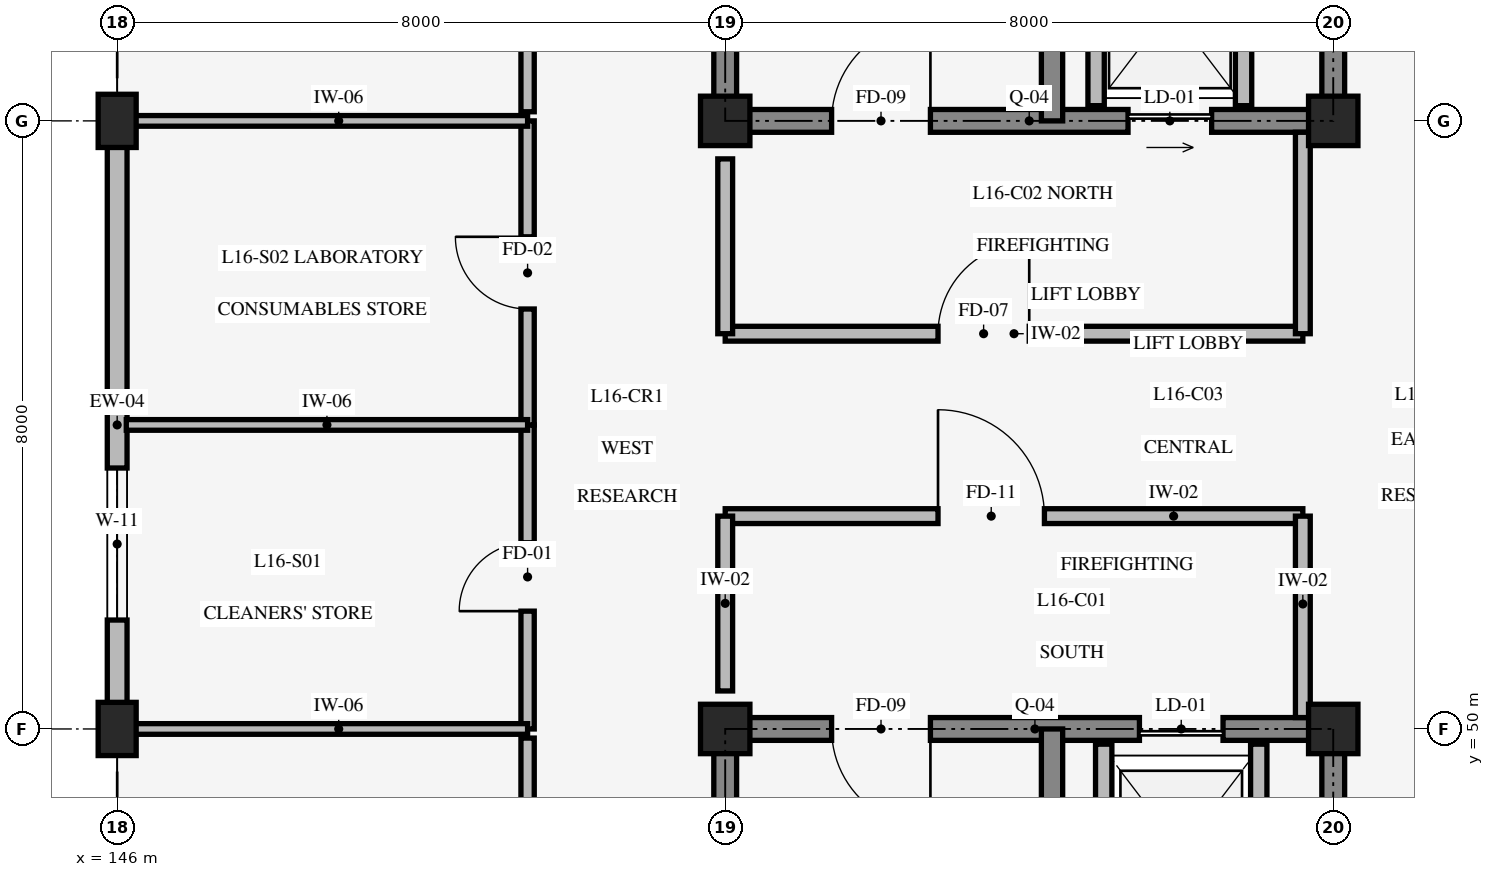
"""IFC4 building model, lengths in metres.
Left out: names, types, materials, properties, quantities, classifications, styles, units other than length and angle.
Written with IfcOpenShell. Run it as: python <this file> out.ifc"""

import sys

from ifc_helpers import new_model, si_unit, direction, frame, frame_2d, origin, origin_2d, place, context, subcontext, project, spatial, rectangle, extrude, element, fill, save


model = new_model("IFC4")
c1 = context("Model", 3, precision=1e-05, world=origin(), true_north=direction((0.0, 1.0)))
c2 = subcontext(c1, "Body", "Model", "MODEL_VIEW")
j1 = project(units=[si_unit("LENGTHUNIT", "METRE"), si_unit("PLANEANGLEUNIT", "RADIAN")], contexts=[c1])
p1 = place(None, origin())
s1 = spatial("IfcSite", under=j1, at=p1, CompositionType="ELEMENT")
p2 = place(p1, origin())
s2 = spatial("IfcBuilding", under=s1, at=p2, CompositionType="ELEMENT")
p3 = place(p2, frame((0.0, 0.0, 65.4)))
s3 = spatial("IfcBuildingStorey", under=s2, at=p3, CompositionType="ELEMENT", Elevation=65.4)
p4 = place(p3, frame((162.0, 42.0, 0.0), z_axis=(0.0, 0.0, 1.0), x_axis=(0.0, 1.0, 0.0)))
e1 = element("IfcWall", 1, at=p4, inside=s3, PredefinedType="SHEAR", context=c2, shape_type="SweptSolid", body=[
    extrude(rectangle(XDim=8.0, YDim=0.3, at=frame_2d((4.0, 0.0))), origin(), (0.0, 0.0, 1.0), 3.95),
])
p5 = place(p4, frame((3.175, 0.0, 0.0)))
e2 = element("IfcOpeningElement", 2, at=p5, cuts=e1, PredefinedType="OPENING", context=c2, shape_type="SweptSolid", body=[
    extrude(rectangle(XDim=1.05, YDim=2.2, at=frame_2d((0.525, 1.1))), frame((0.0, 0.16, 0.0), z_axis=(0.0, -1.0, 0.0), x_axis=(1.0, 0.0, 0.0)), (0.0, 0.0, 1.0), 0.32),
])
p6 = place(p3, frame((162.0, 50.0, 0.0), z_axis=(0.0, 0.0, 1.0), x_axis=(-1.0, 0.0, 0.0)))
e3 = element("IfcWall", 3, at=p6, inside=s3, PredefinedType="SHEAR", context=c2, shape_type="SweptSolid", body=[
    extrude(rectangle(XDim=8.0, YDim=0.3, at=frame_2d((4.0, 0.0))), origin(), (0.0, 0.0, 1.0), 3.95),
])
p7 = place(p6, frame((5.3, 0.0, 0.0)))
e4 = element("IfcOpeningElement", 4, at=p7, cuts=e3, PredefinedType="OPENING", context=c2, shape_type="SweptSolid", body=[
    extrude(rectangle(XDim=1.3, YDim=2.15, at=frame_2d((0.65, 1.075))), frame((0.0, 0.16, 0.0), z_axis=(0.0, -1.0, 0.0), x_axis=(1.0, 0.0, 0.0)), (0.0, 0.0, 1.0), 0.32),
])
p8 = place(p6, frame((1.45, 0.0, 0.0)))
e5 = element("IfcOpeningElement", 5, at=p8, cuts=e3, PredefinedType="OPENING", context=c2, shape_type="SweptSolid", body=[
    extrude(rectangle(XDim=1.1, YDim=2.2, at=frame_2d((0.55, 1.1))), frame((0.0, 0.16, 0.0), z_axis=(0.0, -1.0, 0.0), x_axis=(1.0, 0.0, 0.0)), (0.0, 0.0, 1.0), 0.32),
])
p9 = place(p3, frame((154.0, 50.0, 0.0), z_axis=(0.0, 0.0, 1.0), x_axis=(0.0, -1.0, 0.0)))
e6 = element("IfcWall", 6, at=p9, inside=s3, PredefinedType="SHEAR", context=c2, shape_type="SweptSolid", body=[
    extrude(rectangle(XDim=8.0, YDim=0.3, at=frame_2d((4.0, 0.0))), origin(), (0.0, 0.0, 1.0), 3.95),
])
p10 = place(p3, frame((158.3, 42.0, 0.0), z_axis=(0.0, 0.0, 1.0), x_axis=(0.0, 1.0, 0.0)))
e7 = element("IfcWall", 7, at=p10, inside=s3, PredefinedType="SHEAR", context=c2, shape_type="SweptSolid", body=[
    extrude(rectangle(XDim=8.0, YDim=0.28, at=frame_2d((4.0, 0.0))), origin(), (0.0, 0.0, 1.0), 3.95),
])
p11 = place(p3, frame((154.0, 58.0, 0.0), z_axis=(0.0, 0.0, 1.0), x_axis=(1.0, 0.0, 0.0)))
e8 = element("IfcWall", 8, at=p11, inside=s3, PredefinedType="SHEAR", context=c2, shape_type="SweptSolid", body=[
    extrude(rectangle(XDim=8.0, YDim=0.3, at=frame_2d((4.0, 0.0))), origin(), (0.0, 0.0, 1.0), 3.95),
])
p12 = place(p11, frame((1.4, 0.0, 0.0)))
e9 = element("IfcOpeningElement", 9, at=p12, cuts=e8, PredefinedType="OPENING", context=c2, shape_type="SweptSolid", body=[
    extrude(rectangle(XDim=1.3, YDim=2.15, at=frame_2d((0.65, 1.075))), frame((0.0, 0.16, 0.0), z_axis=(0.0, -1.0, 0.0), x_axis=(1.0, 0.0, 0.0)), (0.0, 0.0, 1.0), 0.32),
])
p13 = place(p11, frame((5.3, 0.0, 0.0)))
e10 = element("IfcOpeningElement", 10, at=p13, cuts=e8, PredefinedType="OPENING", context=c2, shape_type="SweptSolid", body=[
    extrude(rectangle(XDim=1.1, YDim=2.2, at=frame_2d((0.55, 1.1))), frame((0.0, 0.16, 0.0), z_axis=(0.0, -1.0, 0.0), x_axis=(1.0, 0.0, 0.0)), (0.0, 0.0, 1.0), 0.32),
])
p14 = place(p3, frame((162.0, 58.0, 0.0), z_axis=(0.0, 0.0, 1.0), x_axis=(0.0, 1.0, 0.0)))
e11 = element("IfcWall", 11, at=p14, inside=s3, PredefinedType="SHEAR", context=c2, shape_type="SweptSolid", body=[
    extrude(rectangle(XDim=8.0, YDim=0.3, at=frame_2d((4.0, 0.0))), origin(), (0.0, 0.0, 1.0), 3.95),
])
p15 = place(p14, frame((3.275, 0.0, 0.0)))
e12 = element("IfcOpeningElement", 12, at=p15, cuts=e11, PredefinedType="OPENING", context=c2, shape_type="SweptSolid", body=[
    extrude(rectangle(XDim=1.05, YDim=2.2, at=frame_2d((0.525, 1.1))), frame((0.0, 0.16, 0.0), z_axis=(0.0, -1.0, 0.0), x_axis=(1.0, 0.0, 0.0)), (0.0, 0.0, 1.0), 0.32),
])
p16 = place(p14, frame((5.45, 0.0, 0.0)))
e13 = element("IfcOpeningElement", 13, at=p16, cuts=e11, PredefinedType="OPENING", context=c2, shape_type="SweptSolid", body=[
    extrude(rectangle(XDim=1.4, YDim=2.3, at=frame_2d((0.7, 1.15))), frame((0.0, 0.16, 0.0), z_axis=(0.0, -1.0, 0.0), x_axis=(1.0, 0.0, 0.0)), (0.0, 0.0, 1.0), 0.32),
])
p17 = place(p3, frame((154.0, 66.0, 0.0), z_axis=(0.0, 0.0, 1.0), x_axis=(0.0, -1.0, 0.0)))
e14 = element("IfcWall", 14, at=p17, inside=s3, PredefinedType="SHEAR", context=c2, shape_type="SweptSolid", body=[
    extrude(rectangle(XDim=8.0, YDim=0.3, at=frame_2d((4.0, 0.0))), origin(), (0.0, 0.0, 1.0), 3.95),
])
p18 = place(p3, frame((158.3, 58.0, 0.0), z_axis=(0.0, 0.0, 1.0), x_axis=(0.0, 1.0, 0.0)))
e15 = element("IfcWall", 15, at=p18, inside=s3, PredefinedType="SHEAR", context=c2, shape_type="SweptSolid", body=[
    extrude(rectangle(XDim=8.0, YDim=0.28, at=frame_2d((4.0, 0.0))), origin(), (0.0, 0.0, 1.0), 3.95),
])
for number, where, z_axis, x_axis in (
    (16, (146.0, 50.0, 0.0), (0.0, 0.0, 1.0), (1.0, 0.0, 0.0)),
    (17, (146.0, 58.0, 0.0), (0.0, 0.0, 1.0), (1.0, 0.0, 0.0)),
):
    element("IfcColumn", number, at=place(p3, frame(where, z_axis=z_axis, x_axis=x_axis)), inside=s3, PredefinedType="COLUMN", context=c2, shape_type="SweptSolid", body=[
        extrude(rectangle(XDim=0.5, YDim=0.7, at=origin_2d()), origin(), (0.0, 0.0, 1.0), 4.2),
    ])
for number, where, z_axis, x_axis in (
    (18, (154.0, 50.0, 0.0), (0.0, 0.0, 1.0), (1.0, 0.0, 0.0)),
    (19, (154.0, 58.0, 0.0), (0.0, 0.0, 1.0), (1.0, 0.0, 0.0)),
    (20, (162.0, 50.0, 0.0), (0.0, 0.0, 1.0), (1.0, 0.0, 0.0)),
    (21, (162.0, 58.0, 0.0), (0.0, 0.0, 1.0), (1.0, 0.0, 0.0)),
):
    element("IfcColumn", number, at=place(p3, frame(where, z_axis=z_axis, x_axis=x_axis)), inside=s3, PredefinedType="COLUMN", context=c2, shape_type="SweptSolid", body=[
        extrude(rectangle(XDim=0.65, YDim=0.65, at=origin_2d()), origin(), (0.0, 0.0, 1.0), 4.2),
    ])
p19 = place(p3, frame((146.0, 50.0, 0.0), z_axis=(0.0, 0.0, 1.0), x_axis=(0.0, 1.0, 0.0)))
e22 = element("IfcWall", 22, at=p19, inside=s3, PredefinedType="STANDARD", context=c2, shape_type="SweptSolid", body=[
    extrude(rectangle(XDim=8.0, YDim=0.26, at=frame_2d((4.0, 0.0))), origin(), (0.0, 0.0, 1.0), 3.29),
])
p20 = place(p19, frame((1.433, 0.0, 0.85)))
e23 = element("IfcOpeningElement", 23, at=p20, cuts=e22, PredefinedType="OPENING", context=c2, shape_type="SweptSolid", body=[
    extrude(rectangle(XDim=2.0, YDim=1.5, at=frame_2d((1.0, 0.75))), frame((0.0, 0.14, 0.0), z_axis=(0.0, -1.0, 0.0), x_axis=(1.0, 0.0, 0.0)), (0.0, 0.0, 1.0), 0.28),
])
for number, where, z_axis, x_axis in (
    (24, (158.98, 47.02, 0.0), (0.0, 0.0, 1.0), (0.0, 1.0, 0.0)),
    (25, (161.02, 47.02, 0.0), (0.0, 0.0, 1.0), (0.0, 1.0, 0.0)),
):
    element("IfcWall", number, at=place(p3, frame(where, z_axis=z_axis, x_axis=x_axis)), inside=s3, PredefinedType="STANDARD", context=c2, shape_type="SweptSolid", body=[
        extrude(rectangle(XDim=2.78, YDim=0.215, at=frame_2d((1.39, 0.0))), origin(), (0.0, 0.0, 1.0), 3.9),
    ])
for number, where, z_axis, x_axis in (
    (26, (160.82, 58.2, 0.0), (0.0, 0.0, 1.0), (0.0, 1.0, 0.0)),
    (27, (158.88, 58.2, 0.0), (0.0, 0.0, 1.0), (0.0, 1.0, 0.0)),
):
    element("IfcWall", number, at=place(p3, frame(where, z_axis=z_axis, x_axis=x_axis)), inside=s3, PredefinedType="STANDARD", context=c2, shape_type="SweptSolid", body=[
        extrude(rectangle(XDim=2.55, YDim=0.215, at=frame_2d((1.275, 0.0))), origin(), (0.0, 0.0, 1.0), 3.9),
    ])
p21 = place(p3, frame((154.0, 52.8, 0.0), z_axis=(0.0, 0.0, 1.0), x_axis=(1.0, 0.0, 0.0)))
e28 = element("IfcWall", 28, at=p21, inside=s3, PredefinedType="STANDARD", context=c2, shape_type="SweptSolid", body=[
    extrude(rectangle(XDim=7.6, YDim=0.195, at=frame_2d((3.8, 0.0))), origin(), (0.0, 0.0, 1.0), 3.9),
])
p22 = place(p21, frame((2.8, 0.0, 0.0)))
e29 = element("IfcOpeningElement", 29, at=p22, cuts=e28, PredefinedType="OPENING", context=c2, shape_type="SweptSolid", body=[
    extrude(rectangle(XDim=1.4, YDim=2.2, at=frame_2d((0.7, 1.1))), frame((0.0, 0.107, 0.0), z_axis=(0.0, -1.0, 0.0), x_axis=(1.0, 0.0, 0.0)), (0.0, 0.0, 1.0), 0.215),
])
p23 = place(p3, frame((161.6, 50.15, 0.0), z_axis=(0.0, 0.0, 1.0), x_axis=(0.0, 1.0, 0.0)))
e30 = element("IfcWall", 30, at=p23, inside=s3, PredefinedType="STANDARD", context=c2, shape_type="SweptSolid", body=[
    extrude(rectangle(XDim=2.65, YDim=0.195, at=frame_2d((1.325, 0.0))), origin(), (0.0, 0.0, 1.0), 3.29),
])
p24 = place(p3, frame((154.0, 50.5, 0.0), z_axis=(0.0, 0.0, 1.0), x_axis=(0.0, 1.0, 0.0)))
e31 = element("IfcWall", 31, at=p24, inside=s3, PredefinedType="STANDARD", context=c2, shape_type="SweptSolid", body=[
    extrude(rectangle(XDim=2.3, YDim=0.195, at=frame_2d((1.15, 0.0))), origin(), (0.0, 0.0, 1.0), 3.29),
])
p25 = place(p3, frame((154.0, 55.2, 0.0), z_axis=(0.0, 0.0, 1.0), x_axis=(1.0, 0.0, 0.0)))
e32 = element("IfcWall", 32, at=p25, inside=s3, PredefinedType="STANDARD", context=c2, shape_type="SweptSolid", body=[
    extrude(rectangle(XDim=7.6, YDim=0.195, at=frame_2d((3.8, 0.0))), origin(), (0.0, 0.0, 1.0), 3.9),
])
p26 = place(p25, frame((2.8, 0.0, 0.0)))
e33 = element("IfcOpeningElement", 33, at=p26, cuts=e32, PredefinedType="OPENING", context=c2, shape_type="SweptSolid", body=[
    extrude(rectangle(XDim=1.2, YDim=2.1, at=frame_2d((0.6, 1.05))), frame((0.0, 0.107, 0.0), z_axis=(0.0, -1.0, 0.0), x_axis=(1.0, 0.0, 0.0)), (0.0, 0.0, 1.0), 0.215),
])
p27 = place(p3, frame((161.6, 55.2, 0.0), z_axis=(0.0, 0.0, 1.0), x_axis=(0.0, 1.0, 0.0)))
e34 = element("IfcWall", 34, at=p27, inside=s3, PredefinedType="STANDARD", context=c2, shape_type="SweptSolid", body=[
    extrude(rectangle(XDim=2.65, YDim=0.195, at=frame_2d((1.325, 0.0))), origin(), (0.0, 0.0, 1.0), 3.29),
])
p28 = place(p3, frame((154.0, 55.2, 0.0), z_axis=(0.0, 0.0, 1.0), x_axis=(0.0, 1.0, 0.0)))
e35 = element("IfcWall", 35, at=p28, inside=s3, PredefinedType="STANDARD", context=c2, shape_type="SweptSolid", body=[
    extrude(rectangle(XDim=2.3, YDim=0.195, at=frame_2d((1.15, 0.0))), origin(), (0.0, 0.0, 1.0), 3.29),
])
p29 = place(p3, frame((151.4, 42.05, 0.0), z_axis=(0.0, 0.0, 1.0), x_axis=(0.0, 1.0, 0.0)))
e36 = element("IfcWall", 36, at=p29, inside=s3, PredefinedType="STANDARD", context=c2, shape_type="SweptSolid", body=[
    extrude(rectangle(XDim=7.83, YDim=0.175, at=frame_2d((3.915, 0.0))), origin(), (0.0, 0.0, 1.0), 3.9),
])
p30 = place(p29, frame((2.965, 0.0, 0.0)))
e37 = element("IfcOpeningElement", 37, at=p30, cuts=e36, PredefinedType="OPENING", context=c2, shape_type="SweptSolid", body=[
    extrude(rectangle(XDim=1.9, YDim=2.35, at=frame_2d((0.95, 1.175))), frame((0.0, 0.098, 0.0), z_axis=(0.0, -1.0, 0.0), x_axis=(1.0, 0.0, 0.0)), (0.0, 0.0, 1.0), 0.195),
])
p31 = place(p3, frame((151.4, 58.12, 0.0), z_axis=(0.0, 0.0, 1.0), x_axis=(0.0, 1.0, 0.0)))
e38 = element("IfcWall", 38, at=p31, inside=s3, PredefinedType="STANDARD", context=c2, shape_type="SweptSolid", body=[
    extrude(rectangle(XDim=7.83, YDim=0.175, at=frame_2d((3.915, 0.0))), origin(), (0.0, 0.0, 1.0), 3.9),
])
p32 = place(p31, frame((3.465, 0.0, 0.0)))
e39 = element("IfcOpeningElement", 39, at=p32, cuts=e38, PredefinedType="OPENING", context=c2, shape_type="SweptSolid", body=[
    extrude(rectangle(XDim=0.9, YDim=2.1, at=frame_2d((0.45, 1.05))), frame((0.0, 0.098, 0.0), z_axis=(0.0, -1.0, 0.0), x_axis=(1.0, 0.0, 0.0)), (0.0, 0.0, 1.0), 0.195),
])
p33 = place(p3, frame((151.4, 50.0, 0.0), z_axis=(0.0, 0.0, 1.0), x_axis=(0.0, 1.0, 0.0)))
e40 = element("IfcWall", 40, at=p33, inside=s3, PredefinedType="STANDARD", context=c2, shape_type="SweptSolid", body=[
    extrude(rectangle(XDim=4.0, YDim=0.175, at=frame_2d((2.0, 0.0))), origin(), (0.0, 0.0, 1.0), 3.9),
])
p34 = place(p33, frame((1.55, 0.0, 0.0)))
e41 = element("IfcOpeningElement", 41, at=p34, cuts=e40, PredefinedType="OPENING", context=c2, shape_type="SweptSolid", body=[
    extrude(rectangle(XDim=0.9, YDim=2.1, at=frame_2d((0.45, 1.05))), frame((0.0, 0.098, 0.0), z_axis=(0.0, -1.0, 0.0), x_axis=(1.0, 0.0, 0.0)), (0.0, 0.0, 1.0), 0.195),
])
p35 = place(p3, frame((151.4, 54.0, 0.0), z_axis=(0.0, 0.0, 1.0), x_axis=(0.0, 1.0, 0.0)))
e42 = element("IfcWall", 42, at=p35, inside=s3, PredefinedType="STANDARD", context=c2, shape_type="SweptSolid", body=[
    extrude(rectangle(XDim=4.0, YDim=0.175, at=frame_2d((2.0, 0.0))), origin(), (0.0, 0.0, 1.0), 3.9),
])
p36 = place(p35, frame((1.525, 0.0, 0.0)))
e43 = element("IfcOpeningElement", 43, at=p36, cuts=e42, PredefinedType="OPENING", context=c2, shape_type="SweptSolid", body=[
    extrude(rectangle(XDim=0.95, YDim=2.1, at=frame_2d((0.475, 1.05))), frame((0.0, 0.098, 0.0), z_axis=(0.0, -1.0, 0.0), x_axis=(1.0, 0.0, 0.0)), (0.0, 0.0, 1.0), 0.195),
])
p37 = place(p3, frame((146.12, 50.0, 0.0), z_axis=(0.0, 0.0, 1.0), x_axis=(1.0, 0.0, 0.0)))
e44 = element("IfcWall", 44, at=p37, inside=s3, PredefinedType="STANDARD", context=c2, shape_type="SweptSolid", body=[
    extrude(rectangle(XDim=5.28, YDim=0.14, at=frame_2d((2.64, 0.0))), origin(), (0.0, 0.0, 1.0), 3.24),
])
p38 = place(p3, frame((146.12, 54.0, 0.0), z_axis=(0.0, 0.0, 1.0), x_axis=(1.0, 0.0, 0.0)))
e45 = element("IfcWall", 45, at=p38, inside=s3, PredefinedType="STANDARD", context=c2, shape_type="SweptSolid", body=[
    extrude(rectangle(XDim=5.28, YDim=0.14, at=frame_2d((2.64, 0.0))), origin(), (0.0, 0.0, 1.0), 3.9),
])
p39 = place(p3, frame((146.12, 58.0, 0.0), z_axis=(0.0, 0.0, 1.0), x_axis=(1.0, 0.0, 0.0)))
e46 = element("IfcWall", 46, at=p39, inside=s3, PredefinedType="STANDARD", context=c2, shape_type="SweptSolid", body=[
    extrude(rectangle(XDim=5.28, YDim=0.14, at=frame_2d((2.64, 0.0))), origin(), (0.0, 0.0, 1.0), 3.24),
])
p40 = place(p20, origin())
e47 = element("IfcWindow", 47, at=p40, inside=s3, PartitioningType="SINGLE_PANEL", PredefinedType="WINDOW", context=c2, shape_type="SweptSolid", body=[
    extrude(rectangle(XDim=2.0, YDim=1.5, at=frame_2d((1.0, 0.75))), frame((0.0, 0.03, 0.0), z_axis=(0.0, -1.0, 0.0), x_axis=(1.0, 0.0, 0.0)), (0.0, 0.0, 1.0), 0.06),
])
fill(e23, e47)
p41 = place(p7, origin())
e48 = element("IfcDoor", 48, at=p41, inside=s3, OperationType="SINGLE_SWING_LEFT", PredefinedType="DOOR", context=c2, shape_type="SweptSolid", body=[
    extrude(rectangle(XDim=1.3, YDim=2.15, at=frame_2d((0.65, 1.075))), frame((0.0, 0.025, 0.0), z_axis=(0.0, -1.0, 0.0), x_axis=(1.0, 0.0, 0.0)), (0.0, 0.0, 1.0), 0.05),
])
fill(e4, e48)
p42 = place(p8, origin())
e49 = element("IfcDoor", 49, at=p42, inside=s3, OperationType="SLIDING_TO_LEFT", PredefinedType="DOOR", context=c2, shape_type="SweptSolid", body=[
    extrude(rectangle(XDim=1.1, YDim=2.2, at=frame_2d((0.55, 1.1))), frame((0.0, 0.025, 0.0), z_axis=(0.0, -1.0, 0.0), x_axis=(1.0, 0.0, 0.0)), (0.0, 0.0, 1.0), 0.05),
])
fill(e5, e49)
p43 = place(p12, origin())
e50 = element("IfcDoor", 50, at=p43, inside=s3, OperationType="SINGLE_SWING_RIGHT", PredefinedType="DOOR", context=c2, shape_type="SweptSolid", body=[
    extrude(rectangle(XDim=1.3, YDim=2.15, at=frame_2d((0.65, 1.075))), frame((0.0, 0.025, 0.0), z_axis=(0.0, -1.0, 0.0), x_axis=(1.0, 0.0, 0.0)), (0.0, 0.0, 1.0), 0.05),
])
fill(e9, e50)
p44 = place(p13, origin())
e51 = element("IfcDoor", 51, at=p44, inside=s3, OperationType="SLIDING_TO_RIGHT", PredefinedType="DOOR", context=c2, shape_type="SweptSolid", body=[
    extrude(rectangle(XDim=1.1, YDim=2.2, at=frame_2d((0.55, 1.1))), frame((0.0, 0.025, 0.0), z_axis=(0.0, -1.0, 0.0), x_axis=(1.0, 0.0, 0.0)), (0.0, 0.0, 1.0), 0.05),
])
fill(e10, e51)
p45 = place(p22, origin())
e52 = element("IfcDoor", 52, at=p45, inside=s3, OperationType="SINGLE_SWING_LEFT", PredefinedType="DOOR", context=c2, shape_type="SweptSolid", body=[
    extrude(rectangle(XDim=1.4, YDim=2.2, at=frame_2d((0.7, 1.1))), frame((0.0, 0.025, 0.0), z_axis=(0.0, -1.0, 0.0), x_axis=(1.0, 0.0, 0.0)), (0.0, 0.0, 1.0), 0.05),
])
fill(e29, e52)
p46 = place(p26, origin())
e53 = element("IfcDoor", 53, at=p46, inside=s3, OperationType="SINGLE_SWING_RIGHT", PredefinedType="DOOR", context=c2, shape_type="SweptSolid", body=[
    extrude(rectangle(XDim=1.2, YDim=2.1, at=frame_2d((0.6, 1.05))), frame((0.0, 0.025, 0.0), z_axis=(0.0, -1.0, 0.0), x_axis=(1.0, 0.0, 0.0)), (0.0, 0.0, 1.0), 0.05),
])
fill(e33, e53)
p47 = place(p34, origin())
e54 = element("IfcDoor", 54, at=p47, inside=s3, OperationType="SINGLE_SWING_LEFT", PredefinedType="DOOR", context=c2, shape_type="SweptSolid", body=[
    extrude(rectangle(XDim=0.9, YDim=2.1, at=frame_2d((0.45, 1.05))), frame((0.0, 0.025, 0.0), z_axis=(0.0, -1.0, 0.0), x_axis=(1.0, 0.0, 0.0)), (0.0, 0.0, 1.0), 0.05),
])
fill(e41, e54)
p48 = place(p36, origin())
e55 = element("IfcDoor", 55, at=p48, inside=s3, OperationType="SINGLE_SWING_RIGHT", PredefinedType="DOOR", context=c2, shape_type="SweptSolid", body=[
    extrude(rectangle(XDim=0.95, YDim=2.1, at=frame_2d((0.475, 1.05))), frame((0.0, 0.025, 0.0), z_axis=(0.0, -1.0, 0.0), x_axis=(1.0, 0.0, 0.0)), (0.0, 0.0, 1.0), 0.05),
])
fill(e43, e55)
save(model, sys.argv[1])
